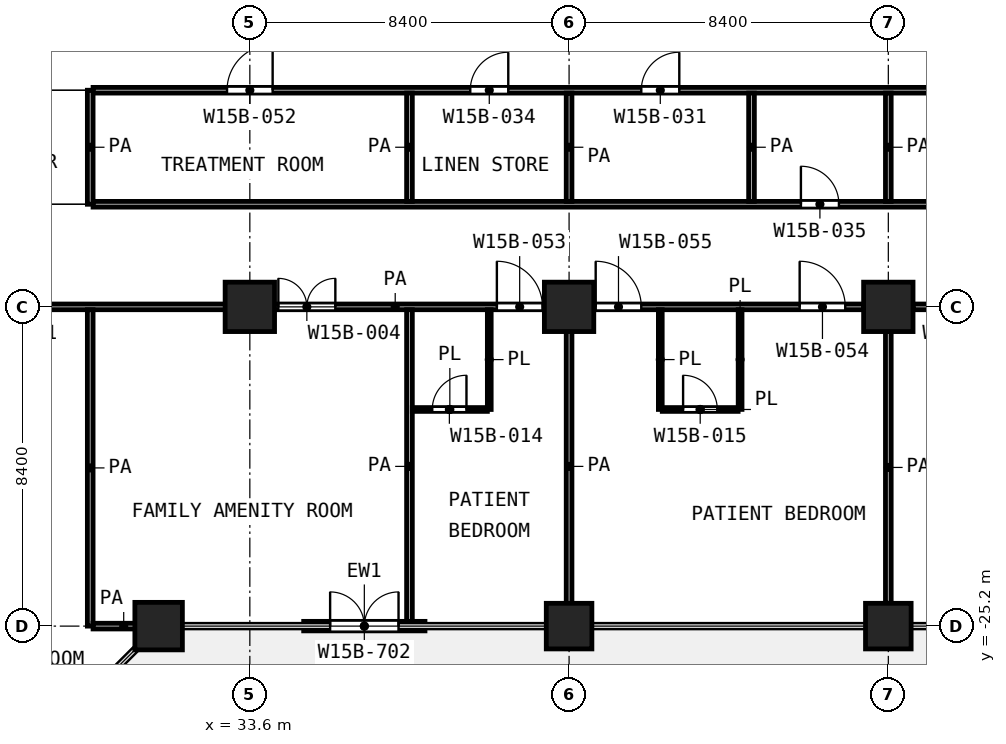
"""IFC4 building model, lengths in metres.
Left out: names, types, materials, properties, quantities, classifications, styles, units other than length and angle.
Written with IfcOpenShell. Run it as: python <this file> out.ifc"""

import sys

from ifc_helpers import new_model, si_unit, direction, frame, frame_2d, origin, origin_2d, place, context, subcontext, project, spatial, rectangle, extrude, element, fill, save


model = new_model("IFC4")
c1 = context("Model", 3, precision=1e-05, world=origin(), true_north=direction((0.0, 1.0)))
c2 = subcontext(c1, "Body", "Model", "MODEL_VIEW")
j1 = project(units=[si_unit("LENGTHUNIT", "METRE"), si_unit("PLANEANGLEUNIT", "RADIAN")], contexts=[c1])
p1 = place(None, origin())
s1 = spatial("IfcSite", under=j1, at=p1, CompositionType="ELEMENT")
p2 = place(p1, origin())
s2 = spatial("IfcBuilding", under=s1, at=p2, CompositionType="ELEMENT")
p3 = place(p2, frame((0.0, 0.0, 85.4)))
s3 = spatial("IfcBuildingStorey", under=s2, at=p3, CompositionType="ELEMENT", Elevation=85.4)
for number, where, z_axis, x_axis in (
    (1, (33.6, -16.8, 0.0), (0.0, 0.0, 1.0), (1.0, 0.0, 0.0)),
    (2, (42.0, -16.8, 0.0), (0.0, 0.0, 1.0), (1.0, 0.0, 0.0)),
    (3, (50.4, -16.8, 0.0), (0.0, 0.0, 1.0), (1.0, 0.0, 0.0)),
):
    element("IfcColumn", number, at=place(p3, frame(where, z_axis=z_axis, x_axis=x_axis)), inside=s3, PredefinedType="COLUMN", context=c2, shape_type="SweptSolid", body=[
        extrude(rectangle(XDim=1.3, YDim=1.3, at=origin_2d()), origin(), (0.0, 0.0, 1.0), 4.2),
    ])
p4 = place(p3, frame((31.2, -25.2, 0.0), z_axis=(0.0, 0.0, 1.0), x_axis=(1.0, 0.0, 0.0)))
e4 = element("IfcColumn", 4, at=p4, inside=s3, PredefinedType="COLUMN", context=c2, shape_type="SweptSolid", body=[
    extrude(rectangle(XDim=1.25, YDim=1.25, at=origin_2d()), origin(), (0.0, 0.0, 1.0), 4.2),
])
for number, where, z_axis, x_axis in (
    (5, (42.0, -25.2, 0.0), (0.0, 0.0, 1.0), (1.0, 0.0, 0.0)),
    (6, (50.4, -25.2, 0.0), (0.0, 0.0, 1.0), (1.0, 0.0, 0.0)),
):
    element("IfcColumn", number, at=place(p3, frame(where, z_axis=z_axis, x_axis=x_axis)), inside=s3, PredefinedType="COLUMN", context=c2, shape_type="SweptSolid", body=[
        extrude(rectangle(XDim=1.2, YDim=1.2, at=origin_2d()), origin(), (0.0, 0.0, 1.0), 4.2),
    ])
p5 = place(p3, frame((35.017, -25.2, 0.0), z_axis=(0.0, 0.0, 1.0), x_axis=(1.0, 0.0, 0.0)))
e7 = element("IfcWall", 7, at=p5, inside=s3, PredefinedType="SOLIDWALL", context=c2, shape_type="SweptSolid", body=[
    extrude(rectangle(XDim=3.192, YDim=0.25, at=frame_2d((1.596, 0.0))), origin(), (0.0, 0.0, 1.0), 3.78),
])
p6 = place(p5, frame((0.696, 0.0, 0.0)))
e8 = element("IfcOpeningElement", 8, at=p6, cuts=e7, PredefinedType="OPENING", context=c2, shape_type="SweptSolid", body=[
    extrude(rectangle(XDim=1.8, YDim=2.1, at=frame_2d((0.9, 1.05))), frame((0.0, 0.135, 0.0), z_axis=(0.0, -1.0, 0.0), x_axis=(1.0, 0.0, 0.0)), (0.0, 0.0, 1.0), 0.27),
])
p7 = place(p3, frame((37.875, -19.5, 0.0), z_axis=(0.0, 0.0, 1.0), x_axis=(1.0, 0.0, 0.0)))
e9 = element("IfcWall", 9, at=p7, inside=s3, PredefinedType="PARTITIONING", context=c2, shape_type="SweptSolid", body=[
    extrude(rectangle(XDim=1.975, YDim=0.1, at=frame_2d((0.988, 0.0))), origin(), (0.0, 0.0, 1.0), 3.9),
])
p8 = place(p7, frame((0.525, 0.0, 0.0)))
e10 = element("IfcOpeningElement", 10, at=p8, cuts=e9, PredefinedType="OPENING", context=c2, shape_type="SweptSolid", body=[
    extrude(rectangle(XDim=0.9, YDim=2.1, at=frame_2d((0.45, 1.05))), frame((0.0, 0.06, 0.0), z_axis=(0.0, -1.0, 0.0), x_axis=(1.0, 0.0, 0.0)), (0.0, 0.0, 1.0), 0.12),
])
p9 = place(p3, frame((44.452, -19.5, 0.0), z_axis=(0.0, 0.0, 1.0), x_axis=(1.0, 0.0, 0.0)))
e11 = element("IfcWall", 11, at=p9, inside=s3, PredefinedType="PARTITIONING", context=c2, shape_type="SweptSolid", body=[
    extrude(rectangle(XDim=1.996, YDim=0.1, at=frame_2d((0.998, 0.0))), origin(), (0.0, 0.0, 1.0), 3.9),
])
p10 = place(p9, frame((0.548, 0.0, 0.0)))
e12 = element("IfcOpeningElement", 12, at=p10, cuts=e11, PredefinedType="OPENING", context=c2, shape_type="SweptSolid", body=[
    extrude(rectangle(XDim=0.9, YDim=2.1, at=frame_2d((0.45, 1.05))), frame((0.0, 0.06, 0.0), z_axis=(0.0, -1.0, 0.0), x_axis=(1.0, 0.0, 0.0)), (0.0, 0.0, 1.0), 0.12),
])
p11 = place(p3, frame((39.9, -19.5, 0.0), z_axis=(0.0, 0.0, 1.0), x_axis=(0.0, 1.0, 0.0)))
e13 = element("IfcWall", 13, at=p11, inside=s3, PredefinedType="PARTITIONING", context=c2, shape_type="SweptSolid", body=[
    extrude(rectangle(XDim=2.625, YDim=0.1, at=frame_2d((1.312, 0.0))), origin(), (0.0, 0.0, 1.0), 3.9),
])
p12 = place(p3, frame((44.4, -19.499, 0.0), z_axis=(0.0, 0.0, 1.0), x_axis=(0.0, 1.0, 0.0)))
e14 = element("IfcWall", 14, at=p12, inside=s3, PredefinedType="PARTITIONING", context=c2, shape_type="SweptSolid", body=[
    extrude(rectangle(XDim=2.624, YDim=0.1, at=frame_2d((1.312, 0.0))), origin(), (0.0, 0.0, 1.0), 3.9),
])
p13 = place(p3, frame((46.5, -19.498, 0.0), z_axis=(0.0, 0.0, 1.0), x_axis=(0.0, 1.0, 0.0)))
e15 = element("IfcWall", 15, at=p13, inside=s3, PredefinedType="PARTITIONING", context=c2, shape_type="SweptSolid", body=[
    extrude(rectangle(XDim=2.623, YDim=0.1, at=frame_2d((1.312, 0.0))), origin(), (0.0, 0.0, 1.0), 3.9),
])
p14 = place(p3, frame((29.475, -25.2, 0.0), z_axis=(0.0, 0.0, 1.0), x_axis=(1.0, 0.0, 0.0)))
e16 = element("IfcWall", 16, at=p14, inside=s3, PredefinedType="PARTITIONING", context=c2, shape_type="SweptSolid", body=[
    extrude(rectangle(XDim=1.612, YDim=0.15, at=frame_2d((0.806, 0.0))), origin(), (0.0, 0.0, 1.0), 3.9),
])
p15 = place(p3, frame((25.1, -16.8, 0.0), z_axis=(0.0, 0.0, 1.0), x_axis=(1.0, 0.0, 0.0)))
e17 = element("IfcWall", 17, at=p15, inside=s3, PredefinedType="PARTITIONING", context=c2, shape_type="SweptSolid", body=[
    extrude(rectangle(XDim=24.65, YDim=0.15, at=frame_2d((12.325, 0.0))), origin(), (0.0, 0.0, 1.0), 3.9),
])
p16 = place(p15, frame((1.45, 0.0, 0.0)))
e18 = element("IfcOpeningElement", 18, at=p16, cuts=e17, PredefinedType="OPENING", context=c2, shape_type="SweptSolid", body=[
    extrude(rectangle(XDim=1.5, YDim=2.1, at=frame_2d((0.75, 1.05))), frame((0.0, 0.085, 0.0), z_axis=(0.0, -1.0, 0.0), x_axis=(1.0, 0.0, 0.0)), (0.0, 0.0, 1.0), 0.17),
])
p17 = place(p15, frame((9.25, 0.0, 0.0)))
e19 = element("IfcOpeningElement", 19, at=p17, cuts=e17, PredefinedType="OPENING", context=c2, shape_type="SweptSolid", body=[
    extrude(rectangle(XDim=1.5, YDim=2.1, at=frame_2d((0.75, 1.05))), frame((0.0, 0.085, 0.0), z_axis=(0.0, -1.0, 0.0), x_axis=(1.0, 0.0, 0.0)), (0.0, 0.0, 1.0), 0.17),
])
p18 = place(p15, frame((15.0, 0.0, 0.0)))
e20 = element("IfcOpeningElement", 20, at=p18, cuts=e17, PredefinedType="OPENING", context=c2, shape_type="SweptSolid", body=[
    extrude(rectangle(XDim=1.2, YDim=2.1, at=frame_2d((0.6, 1.05))), frame((0.0, 0.085, 0.0), z_axis=(0.0, -1.0, 0.0), x_axis=(1.0, 0.0, 0.0)), (0.0, 0.0, 1.0), 0.17),
])
p19 = place(p15, frame((22.967, 0.0, 0.0)))
e21 = element("IfcOpeningElement", 21, at=p19, cuts=e17, PredefinedType="OPENING", context=c2, shape_type="SweptSolid", body=[
    extrude(rectangle(XDim=1.2, YDim=2.1, at=frame_2d((0.6, 1.05))), frame((0.0, 0.085, 0.0), z_axis=(0.0, -1.0, 0.0), x_axis=(1.0, 0.0, 0.0)), (0.0, 0.0, 1.0), 0.17),
])
p20 = place(p15, frame((17.6, 0.0, 0.0)))
e22 = element("IfcOpeningElement", 22, at=p20, cuts=e17, PredefinedType="OPENING", context=c2, shape_type="SweptSolid", body=[
    extrude(rectangle(XDim=1.2, YDim=2.1, at=frame_2d((0.6, 1.05))), frame((0.0, 0.085, 0.0), z_axis=(0.0, -1.0, 0.0), x_axis=(1.0, 0.0, 0.0)), (0.0, 0.0, 1.0), 0.17),
])
p21 = place(p3, frame((51.05, -16.8, 0.0), z_axis=(0.0, 0.0, 1.0), x_axis=(1.0, 0.0, 0.0)))
e23 = element("IfcWall", 23, at=p21, inside=s3, PredefinedType="PARTITIONING", context=c2, shape_type="SweptSolid", body=[
    extrude(rectangle(XDim=28.67, YDim=0.15, at=frame_2d((14.335, 0.0))), origin(), (0.0, 0.0, 1.0), 3.9),
])
p22 = place(p21, frame((0.975, 0.0, 0.0)))
e24 = element("IfcOpeningElement", 24, at=p22, cuts=e23, PredefinedType="OPENING", context=c2, shape_type="SweptSolid", body=[
    extrude(rectangle(XDim=1.0, YDim=2.1, at=frame_2d((0.5, 1.05))), frame((0.0, 0.085, 0.0), z_axis=(0.0, -1.0, 0.0), x_axis=(1.0, 0.0, 0.0)), (0.0, 0.0, 1.0), 0.17),
])
p23 = place(p21, frame((5.85, 0.0, 0.0)))
e25 = element("IfcOpeningElement", 25, at=p23, cuts=e23, PredefinedType="OPENING", context=c2, shape_type="SweptSolid", body=[
    extrude(rectangle(XDim=1.2, YDim=2.1, at=frame_2d((0.6, 1.05))), frame((0.0, 0.085, 0.0), z_axis=(0.0, -1.0, 0.0), x_axis=(1.0, 0.0, 0.0)), (0.0, 0.0, 1.0), 0.17),
])
p24 = place(p21, frame((8.45, 0.0, 0.0)))
e26 = element("IfcOpeningElement", 26, at=p24, cuts=e23, PredefinedType="OPENING", context=c2, shape_type="SweptSolid", body=[
    extrude(rectangle(XDim=1.2, YDim=2.1, at=frame_2d((0.6, 1.05))), frame((0.0, 0.085, 0.0), z_axis=(0.0, -1.0, 0.0), x_axis=(1.0, 0.0, 0.0)), (0.0, 0.0, 1.0), 0.17),
])
p25 = place(p21, frame((14.25, 0.0, 0.0)))
e27 = element("IfcOpeningElement", 27, at=p25, cuts=e23, PredefinedType="OPENING", context=c2, shape_type="SweptSolid", body=[
    extrude(rectangle(XDim=1.2, YDim=2.1, at=frame_2d((0.6, 1.05))), frame((0.0, 0.085, 0.0), z_axis=(0.0, -1.0, 0.0), x_axis=(1.0, 0.0, 0.0)), (0.0, 0.0, 1.0), 0.17),
])
p26 = place(p21, frame((17.35, 0.0, 0.0)))
e28 = element("IfcOpeningElement", 28, at=p26, cuts=e23, PredefinedType="OPENING", context=c2, shape_type="SweptSolid", body=[
    extrude(rectangle(XDim=1.2, YDim=2.1, at=frame_2d((0.6, 1.05))), frame((0.0, 0.085, 0.0), z_axis=(0.0, -1.0, 0.0), x_axis=(1.0, 0.0, 0.0)), (0.0, 0.0, 1.0), 0.17),
])
p27 = place(p21, frame((25.3, 0.0, 0.0)))
e29 = element("IfcOpeningElement", 29, at=p27, cuts=e23, PredefinedType="OPENING", context=c2, shape_type="SweptSolid", body=[
    extrude(rectangle(XDim=1.5, YDim=2.1, at=frame_2d((0.75, 1.05))), frame((0.0, 0.085, 0.0), z_axis=(0.0, -1.0, 0.0), x_axis=(1.0, 0.0, 0.0)), (0.0, 0.0, 1.0), 0.17),
])
p28 = place(p3, frame((29.475, -14.1, 0.0), z_axis=(0.0, 0.0, 1.0), x_axis=(1.0, 0.0, 0.0)))
e30 = element("IfcWall", 30, at=p28, inside=s3, PredefinedType="PARTITIONING", context=c2, shape_type="SweptSolid", body=[
    extrude(rectangle(XDim=47.55, YDim=0.15, at=frame_2d((23.775, 0.0))), origin(), (0.0, 0.0, 1.0), 3.9),
])
p29 = place(p28, frame((18.625, 0.0, 0.0)))
e31 = element("IfcOpeningElement", 31, at=p29, cuts=e30, PredefinedType="OPENING", context=c2, shape_type="SweptSolid", body=[
    extrude(rectangle(XDim=1.0, YDim=2.1, at=frame_2d((0.5, 1.05))), frame((0.0, 0.085, 0.0), z_axis=(0.0, -1.0, 0.0), x_axis=(1.0, 0.0, 0.0)), (0.0, 0.0, 1.0), 0.17),
])
p30 = place(p28, frame((42.175, 0.0, 0.0)))
e32 = element("IfcOpeningElement", 32, at=p30, cuts=e30, PredefinedType="OPENING", context=c2, shape_type="SweptSolid", body=[
    extrude(rectangle(XDim=1.0, YDim=2.1, at=frame_2d((0.5, 1.05))), frame((0.0, 0.085, 0.0), z_axis=(0.0, -1.0, 0.0), x_axis=(1.0, 0.0, 0.0)), (0.0, 0.0, 1.0), 0.17),
])
p31 = place(p3, frame((29.475, -11.1, 0.0), z_axis=(0.0, 0.0, 1.0), x_axis=(1.0, 0.0, 0.0)))
e33 = element("IfcWall", 33, at=p31, inside=s3, PredefinedType="PARTITIONING", context=c2, shape_type="SweptSolid", body=[
    extrude(rectangle(XDim=47.55, YDim=0.15, at=frame_2d((23.775, 0.0))), origin(), (0.0, 0.0, 1.0), 3.9),
])
p32 = place(p31, frame((3.525, 0.0, 0.0)))
e34 = element("IfcOpeningElement", 34, at=p32, cuts=e33, PredefinedType="OPENING", context=c2, shape_type="SweptSolid", body=[
    extrude(rectangle(XDim=1.2, YDim=2.1, at=frame_2d((0.6, 1.05))), frame((0.0, 0.085, 0.0), z_axis=(0.0, -1.0, 0.0), x_axis=(1.0, 0.0, 0.0)), (0.0, 0.0, 1.0), 0.17),
])
p33 = place(p31, frame((9.925, 0.0, 0.0)))
e35 = element("IfcOpeningElement", 35, at=p33, cuts=e33, PredefinedType="OPENING", context=c2, shape_type="SweptSolid", body=[
    extrude(rectangle(XDim=1.0, YDim=2.1, at=frame_2d((0.5, 1.05))), frame((0.0, 0.085, 0.0), z_axis=(0.0, -1.0, 0.0), x_axis=(1.0, 0.0, 0.0)), (0.0, 0.0, 1.0), 0.17),
])
p34 = place(p31, frame((14.425, 0.0, 0.0)))
e36 = element("IfcOpeningElement", 36, at=p34, cuts=e33, PredefinedType="OPENING", context=c2, shape_type="SweptSolid", body=[
    extrude(rectangle(XDim=1.0, YDim=2.1, at=frame_2d((0.5, 1.05))), frame((0.0, 0.085, 0.0), z_axis=(0.0, -1.0, 0.0), x_axis=(1.0, 0.0, 0.0)), (0.0, 0.0, 1.0), 0.17),
])
p35 = place(p31, frame((28.825, 0.0, 0.0)))
e37 = element("IfcOpeningElement", 37, at=p35, cuts=e33, PredefinedType="OPENING", context=c2, shape_type="SweptSolid", body=[
    extrude(rectangle(XDim=1.0, YDim=2.1, at=frame_2d((0.5, 1.05))), frame((0.0, 0.085, 0.0), z_axis=(0.0, -1.0, 0.0), x_axis=(1.0, 0.0, 0.0)), (0.0, 0.0, 1.0), 0.17),
])
p36 = place(p3, frame((29.4, -25.2, 0.0), z_axis=(0.0, 0.0, 1.0), x_axis=(0.0, 1.0, 0.0)))
e38 = element("IfcWall", 38, at=p36, inside=s3, PredefinedType="PARTITIONING", context=c2, shape_type="SweptSolid", body=[
    extrude(rectangle(XDim=8.325, YDim=0.15, at=frame_2d((4.163, 0.0))), origin(), (0.0, 0.0, 1.0), 3.9),
])
p37 = place(p3, frame((29.4, -14.1, 0.0), z_axis=(0.0, 0.0, 1.0), x_axis=(0.0, 1.0, 0.0)))
e39 = element("IfcWall", 39, at=p37, inside=s3, PredefinedType="PARTITIONING", context=c2, shape_type="SweptSolid", body=[
    extrude(rectangle(XDim=3.0, YDim=0.15, at=frame_2d((1.5, 0.0))), origin(), (0.0, 0.0, 1.0), 3.9),
])
p38 = place(p3, frame((37.8, -25.12, 0.0), z_axis=(0.0, 0.0, 1.0), x_axis=(0.0, 1.0, 0.0)))
e40 = element("IfcWall", 40, at=p38, inside=s3, PredefinedType="PARTITIONING", context=c2, shape_type="SweptSolid", body=[
    extrude(rectangle(XDim=8.245, YDim=0.15, at=frame_2d((4.123, 0.0))), origin(), (0.0, 0.0, 1.0), 3.9),
])
p39 = place(p3, frame((37.8, -14.025, 0.0), z_axis=(0.0, 0.0, 1.0), x_axis=(0.0, 1.0, 0.0)))
e41 = element("IfcWall", 41, at=p39, inside=s3, PredefinedType="PARTITIONING", context=c2, shape_type="SweptSolid", body=[
    extrude(rectangle(XDim=2.85, YDim=0.15, at=frame_2d((1.425, 0.0))), origin(), (0.0, 0.0, 1.0), 3.9),
])
p40 = place(p3, frame((42.0, -25.12, 0.0), z_axis=(0.0, 0.0, 1.0), x_axis=(0.0, 1.0, 0.0)))
e42 = element("IfcWall", 42, at=p40, inside=s3, PredefinedType="PARTITIONING", context=c2, shape_type="SweptSolid", body=[
    extrude(rectangle(XDim=8.245, YDim=0.15, at=frame_2d((4.123, 0.0))), origin(), (0.0, 0.0, 1.0), 3.9),
])
for number, where, z_axis, x_axis in (
    (43, (42.0, -14.025, 0.0), (0.0, 0.0, 1.0), (0.0, 1.0, 0.0)),
    (44, (46.8, -14.025, 0.0), (0.0, 0.0, 1.0), (0.0, 1.0, 0.0)),
):
    element("IfcWall", number, at=place(p3, frame(where, z_axis=z_axis, x_axis=x_axis)), inside=s3, PredefinedType="PARTITIONING", context=c2, shape_type="SweptSolid", body=[
        extrude(rectangle(XDim=2.85, YDim=0.15, at=frame_2d((1.425, 0.0))), origin(), (0.0, 0.0, 1.0), 3.9),
    ])
p41 = place(p3, frame((50.4, -24.6, 0.0), z_axis=(0.0, 0.0, 1.0), x_axis=(0.0, 1.0, 0.0)))
e45 = element("IfcWall", 45, at=p41, inside=s3, PredefinedType="PARTITIONING", context=c2, shape_type="SweptSolid", body=[
    extrude(rectangle(XDim=7.15, YDim=0.15, at=frame_2d((3.575, 0.0))), origin(), (0.0, 0.0, 1.0), 3.9),
])
p42 = place(p3, frame((50.4, -14.025, 0.0), z_axis=(0.0, 0.0, 1.0), x_axis=(0.0, 1.0, 0.0)))
e46 = element("IfcWall", 46, at=p42, inside=s3, PredefinedType="PARTITIONING", context=c2, shape_type="SweptSolid", body=[
    extrude(rectangle(XDim=2.85, YDim=0.15, at=frame_2d((1.425, 0.0))), origin(), (0.0, 0.0, 1.0), 3.9),
])
p43 = place(p6, origin())
e47 = element("IfcDoor", 47, at=p43, inside=s3, OperationType="DOUBLE_DOOR_SINGLE_SWING", PredefinedType="DOOR", context=c2, shape_type="SweptSolid", body=[
    extrude(rectangle(XDim=1.8, YDim=2.1, at=frame_2d((0.9, 1.05))), frame((0.0, 0.025, 0.0), z_axis=(0.0, -1.0, 0.0), x_axis=(1.0, 0.0, 0.0)), (0.0, 0.0, 1.0), 0.05),
])
fill(e8, e47)
p44 = place(p32, origin())
e48 = element("IfcDoor", 48, at=p44, inside=s3, OperationType="SINGLE_SWING_RIGHT", PredefinedType="DOOR", context=c2, shape_type="SweptSolid", body=[
    extrude(rectangle(XDim=1.2, YDim=2.1, at=frame_2d((0.6, 1.05))), frame((0.0, 0.025, 0.0), z_axis=(0.0, -1.0, 0.0), x_axis=(1.0, 0.0, 0.0)), (0.0, 0.0, 1.0), 0.05),
])
fill(e34, e48)
p45 = place(p33, origin())
e49 = element("IfcDoor", 49, at=p45, inside=s3, OperationType="SINGLE_SWING_RIGHT", PredefinedType="DOOR", context=c2, shape_type="SweptSolid", body=[
    extrude(rectangle(XDim=1.0, YDim=2.1, at=frame_2d((0.5, 1.05))), frame((0.0, 0.025, 0.0), z_axis=(0.0, -1.0, 0.0), x_axis=(1.0, 0.0, 0.0)), (0.0, 0.0, 1.0), 0.05),
])
fill(e35, e49)
p46 = place(p34, origin())
e50 = element("IfcDoor", 50, at=p46, inside=s3, OperationType="SINGLE_SWING_RIGHT", PredefinedType="DOOR", context=c2, shape_type="SweptSolid", body=[
    extrude(rectangle(XDim=1.0, YDim=2.1, at=frame_2d((0.5, 1.05))), frame((0.0, 0.025, 0.0), z_axis=(0.0, -1.0, 0.0), x_axis=(1.0, 0.0, 0.0)), (0.0, 0.0, 1.0), 0.05),
])
fill(e36, e50)
p47 = place(p29, origin())
e51 = element("IfcDoor", 51, at=p47, inside=s3, OperationType="SINGLE_SWING_LEFT", PredefinedType="DOOR", context=c2, shape_type="SweptSolid", body=[
    extrude(rectangle(XDim=1.0, YDim=2.1, at=frame_2d((0.5, 1.05))), frame((0.0, 0.025, 0.0), z_axis=(0.0, -1.0, 0.0), x_axis=(1.0, 0.0, 0.0)), (0.0, 0.0, 1.0), 0.05),
])
fill(e31, e51)
p48 = place(p17, origin())
e52 = element("IfcDoor", 52, at=p48, inside=s3, OperationType="DOUBLE_DOOR_SINGLE_SWING", PredefinedType="DOOR", context=c2, shape_type="SweptSolid", body=[
    extrude(rectangle(XDim=1.5, YDim=2.1, at=frame_2d((0.75, 1.05))), frame((0.0, 0.025, 0.0), z_axis=(0.0, -1.0, 0.0), x_axis=(1.0, 0.0, 0.0)), (0.0, 0.0, 1.0), 0.05),
])
fill(e19, e52)
p49 = place(p18, origin())
e53 = element("IfcDoor", 53, at=p49, inside=s3, OperationType="SINGLE_SWING_LEFT", PredefinedType="DOOR", context=c2, shape_type="SweptSolid", body=[
    extrude(rectangle(XDim=1.2, YDim=2.1, at=frame_2d((0.6, 1.05))), frame((0.0, 0.025, 0.0), z_axis=(0.0, -1.0, 0.0), x_axis=(1.0, 0.0, 0.0)), (0.0, 0.0, 1.0), 0.05),
])
fill(e20, e53)
p50 = place(p8, origin())
e54 = element("IfcDoor", 54, at=p50, inside=s3, OperationType="SINGLE_SWING_RIGHT", PredefinedType="DOOR", context=c2, shape_type="SweptSolid", body=[
    extrude(rectangle(XDim=0.9, YDim=2.1, at=frame_2d((0.45, 1.05))), frame((0.0, 0.025, 0.0), z_axis=(0.0, -1.0, 0.0), x_axis=(1.0, 0.0, 0.0)), (0.0, 0.0, 1.0), 0.05),
])
fill(e10, e54)
p51 = place(p19, origin())
e55 = element("IfcDoor", 55, at=p51, inside=s3, OperationType="SINGLE_SWING_LEFT", PredefinedType="DOOR", context=c2, shape_type="SweptSolid", body=[
    extrude(rectangle(XDim=1.2, YDim=2.1, at=frame_2d((0.6, 1.05))), frame((0.0, 0.025, 0.0), z_axis=(0.0, -1.0, 0.0), x_axis=(1.0, 0.0, 0.0)), (0.0, 0.0, 1.0), 0.05),
])
fill(e21, e55)
p52 = place(p20, origin())
e56 = element("IfcDoor", 56, at=p52, inside=s3, OperationType="SINGLE_SWING_LEFT", PredefinedType="DOOR", context=c2, shape_type="SweptSolid", body=[
    extrude(rectangle(XDim=1.2, YDim=2.1, at=frame_2d((0.6, 1.05))), frame((0.0, 0.025, 0.0), z_axis=(0.0, -1.0, 0.0), x_axis=(1.0, 0.0, 0.0)), (0.0, 0.0, 1.0), 0.05),
])
fill(e22, e56)
p53 = place(p10, origin())
e57 = element("IfcDoor", 57, at=p53, inside=s3, OperationType="SINGLE_SWING_LEFT", PredefinedType="DOOR", context=c2, shape_type="SweptSolid", body=[
    extrude(rectangle(XDim=0.9, YDim=2.1, at=frame_2d((0.45, 1.05))), frame((0.0, 0.025, 0.0), z_axis=(0.0, -1.0, 0.0), x_axis=(1.0, 0.0, 0.0)), (0.0, 0.0, 1.0), 0.05),
])
fill(e12, e57)
save(model, sys.argv[1])
